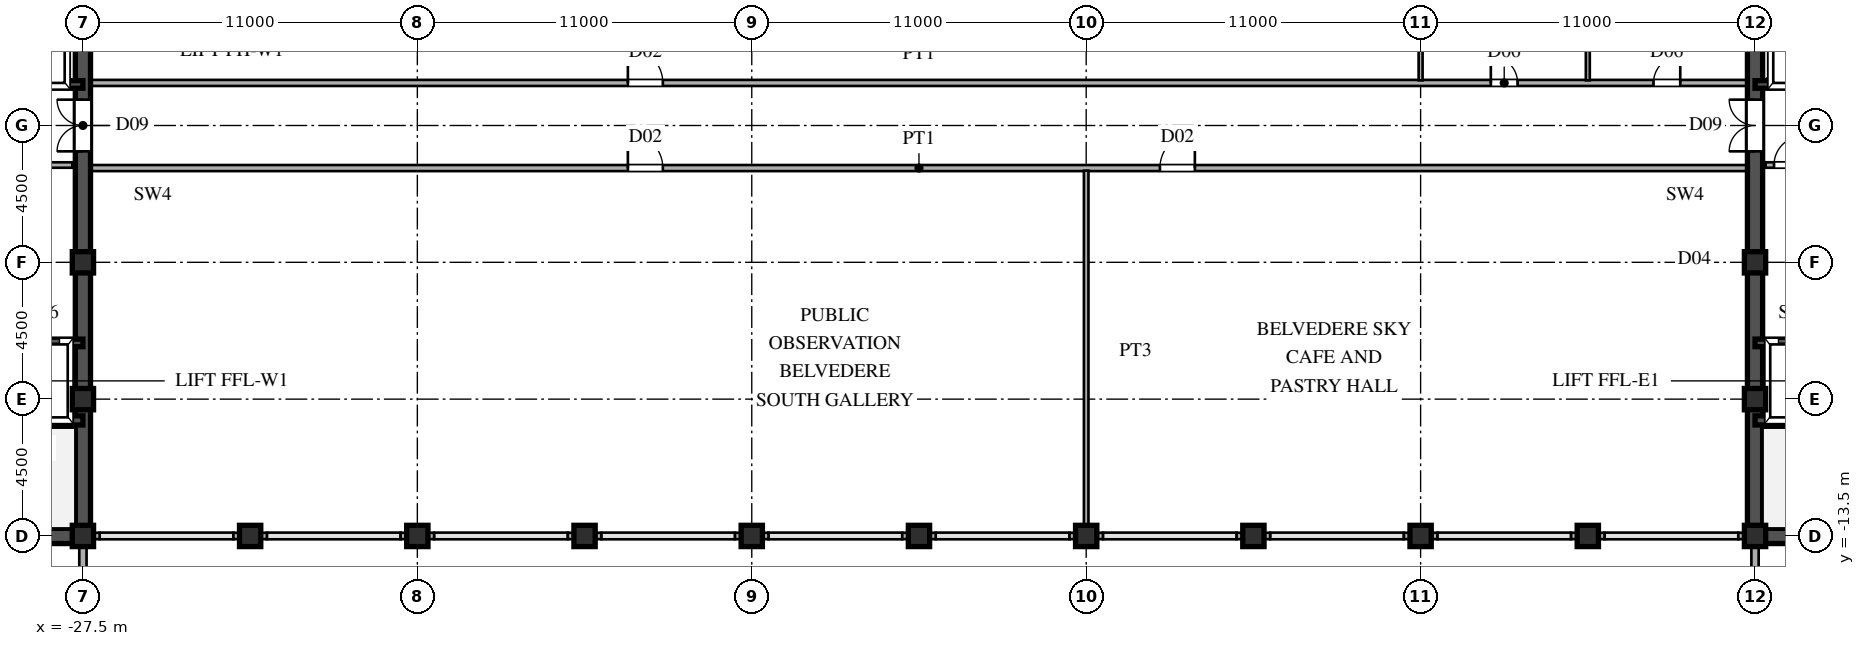
"""IFC4 building model, lengths in metres.
Left out: names, types, materials, properties, quantities, classifications, styles, units other than length and angle.
Written with IfcOpenShell. Run it as: python <this file> out.ifc"""

import sys

from ifc_helpers import new_model, si_unit, direction, frame, frame_2d, origin, origin_2d, place, context, subcontext, project, spatial, rectangle, hollow_rectangle, extrude, source, transform, mapped, element, fill, save


model = new_model("IFC4")
c1 = context("Model", 3, precision=1e-05, world=origin(), true_north=direction((0.0, 1.0)))
c2 = subcontext(c1, "Body", "Model", "MODEL_VIEW")
j1 = project(units=[si_unit("LENGTHUNIT", "METRE"), si_unit("PLANEANGLEUNIT", "RADIAN")], contexts=[c1])
p1 = place(None, origin())
s1 = spatial("IfcSite", under=j1, at=p1, CompositionType="ELEMENT")
p2 = place(p1, origin())
s2 = spatial("IfcBuilding", under=s1, at=p2, CompositionType="ELEMENT")
p3 = place(p2, frame((0.0, 0.0, 269.4)))
s3 = spatial("IfcBuildingStorey", under=s2, at=p3, CompositionType="ELEMENT", Elevation=269.4)
m1 = source(origin(), c2, "Body", "SweptSolid", [
    extrude(hollow_rectangle(XDim=0.7, YDim=0.7, WallThickness=0.03, at=origin_2d()), origin(), (0.0, 0.0, 1.0), 4.8),
])
for number, where, z_axis, x_axis in (
    (1, (-27.5, -13.5, 0.0), (0.0, 0.0, 1.0), (1.0, 0.0, 0.0)),
    (2, (-27.5, -9.0, 0.0), (0.0, 0.0, 1.0), (1.0, 0.0, 0.0)),
    (3, (-27.5, -4.5, 0.0), (0.0, 0.0, 1.0), (1.0, 0.0, 0.0)),
    (4, (27.5, -13.5, 0.0), (0.0, 0.0, 1.0), (1.0, 0.0, 0.0)),
    (5, (27.5, -9.0, 0.0), (0.0, 0.0, 1.0), (1.0, 0.0, 0.0)),
    (6, (27.5, -4.5, 0.0), (0.0, 0.0, 1.0), (1.0, 0.0, 0.0)),
    (7, (-22.0, -13.5, 0.0), (0.0, 0.0, 1.0), (1.0, 0.0, 0.0)),
    (8, (-16.5, -13.5, 0.0), (0.0, 0.0, 1.0), (1.0, 0.0, 0.0)),
    (9, (-11.0, -13.5, 0.0), (0.0, 0.0, 1.0), (1.0, 0.0, 0.0)),
    (10, (-5.5, -13.5, 0.0), (0.0, 0.0, 1.0), (1.0, 0.0, 0.0)),
    (11, (0.0, -13.5, 0.0), (0.0, 0.0, 1.0), (1.0, 0.0, 0.0)),
    (12, (5.5, -13.5, 0.0), (0.0, 0.0, 1.0), (1.0, 0.0, 0.0)),
    (13, (11.0, -13.5, 0.0), (0.0, 0.0, 1.0), (1.0, 0.0, 0.0)),
    (14, (16.5, -13.5, 0.0), (0.0, 0.0, 1.0), (1.0, 0.0, 0.0)),
    (15, (22.0, -13.5, 0.0), (0.0, 0.0, 1.0), (1.0, 0.0, 0.0)),
):
    element("IfcColumn", number, at=place(p3, frame(where, z_axis=z_axis, x_axis=x_axis)), inside=s3, PredefinedType="COLUMN", context=c2, shape_type="MappedRepresentation", body=[
        mapped(m1, transform((0.0, 0.0, 0.0), scale=1.0)),
    ])
p4 = place(p3, frame((-27.5, -15.98, 0.0), z_axis=(0.0, 0.0, 1.0), x_axis=(0.0, 1.0, 0.0)))
e16 = element("IfcWall", 16, at=p4, inside=s3, PredefinedType="SOLIDWALL", context=c2, shape_type="SweptSolid", body=[
    extrude(rectangle(XDim=1.605, YDim=0.24, at=frame_2d((0.803, 0.0))), origin(), (0.0, 0.0, 1.0), 4.54),
])
p5 = place(p3, frame((-27.5, -14.375, 0.0), z_axis=(0.0, 0.0, 1.0), x_axis=(0.0, 1.0, 0.0)))
e17 = element("IfcWall", 17, at=p5, inside=s3, PredefinedType="SOLIDWALL", context=c2, shape_type="SweptSolid", body=[
    extrude(rectangle(XDim=0.62, YDim=0.24, at=frame_2d((0.31, 0.0))), origin(), (0.0, 0.0, 1.0), 4.04),
])
p6 = place(p3, frame((27.5, -15.98, 0.0), z_axis=(0.0, 0.0, 1.0), x_axis=(0.0, 1.0, 0.0)))
e18 = element("IfcWall", 18, at=p6, inside=s3, PredefinedType="SOLIDWALL", context=c2, shape_type="SweptSolid", body=[
    extrude(rectangle(XDim=1.605, YDim=0.24, at=frame_2d((0.803, 0.0))), origin(), (0.0, 0.0, 1.0), 4.54),
])
p7 = place(p3, frame((27.5, -14.375, 0.0), z_axis=(0.0, 0.0, 1.0), x_axis=(0.0, 1.0, 0.0)))
e19 = element("IfcWall", 19, at=p7, inside=s3, PredefinedType="SOLIDWALL", context=c2, shape_type="SweptSolid", body=[
    extrude(rectangle(XDim=0.62, YDim=0.24, at=frame_2d((0.31, 0.0))), origin(), (0.0, 0.0, 1.0), 4.04),
])
p8 = place(p3, frame((-27.49, -13.5, 0.0), z_axis=(0.0, 0.0, 1.0), x_axis=(1.0, 0.0, 0.0)))
e20 = element("IfcWall", 20, at=p8, inside=s3, PredefinedType="SOLIDWALL", context=c2, shape_type="SweptSolid", body=[
    extrude(rectangle(XDim=0.54, YDim=0.21, at=frame_2d((0.27, 0.0))), origin(), (0.0, 0.0, 1.0), 4.04),
])
for number, where, z_axis, x_axis in (
    (21, (-22.55, -13.5, 0.0), (0.0, 0.0, 1.0), (1.0, 0.0, 0.0)),
    (22, (-17.05, -13.5, 0.0), (0.0, 0.0, 1.0), (1.0, 0.0, 0.0)),
    (23, (-11.55, -13.5, 0.0), (0.0, 0.0, 1.0), (1.0, 0.0, 0.0)),
    (24, (-6.05, -13.5, 0.0), (0.0, 0.0, 1.0), (1.0, 0.0, 0.0)),
    (25, (-0.55, -13.5, 0.0), (0.0, 0.0, 1.0), (1.0, 0.0, 0.0)),
    (26, (4.95, -13.5, 0.0), (0.0, 0.0, 1.0), (1.0, 0.0, 0.0)),
    (27, (10.45, -13.5, 0.0), (0.0, 0.0, 1.0), (1.0, 0.0, 0.0)),
    (28, (15.95, -13.5, 0.0), (0.0, 0.0, 1.0), (1.0, 0.0, 0.0)),
    (29, (21.45, -13.5, 0.0), (0.0, 0.0, 1.0), (1.0, 0.0, 0.0)),
):
    element("IfcWall", number, at=place(p3, frame(where, z_axis=z_axis, x_axis=x_axis)), inside=s3, PredefinedType="SOLIDWALL", context=c2, shape_type="SweptSolid", body=[
        extrude(rectangle(XDim=1.1, YDim=0.21, at=frame_2d((0.55, 0.0))), origin(), (0.0, 0.0, 1.0), 4.04),
    ])
p9 = place(p3, frame((26.95, -13.5, 0.0), z_axis=(0.0, 0.0, 1.0), x_axis=(1.0, 0.0, 0.0)))
e30 = element("IfcWall", 30, at=p9, inside=s3, PredefinedType="SOLIDWALL", context=c2, shape_type="SweptSolid", body=[
    extrude(rectangle(XDim=0.54, YDim=0.21, at=frame_2d((0.27, 0.0))), origin(), (0.0, 0.0, 1.0), 4.04),
])
for number, where, z_axis, x_axis in (
    (31, (-27.5, -13.5, 0.0), (0.0, 0.0, 1.0), (0.0, 1.0, 0.0)),
    (32, (-27.5, 1.3, 0.0), (0.0, 0.0, 1.0), (0.0, 1.0, 0.0)),
):
    element("IfcWall", number, at=place(p3, frame(where, z_axis=z_axis, x_axis=x_axis)), inside=s3, PredefinedType="SHEAR", context=c2, shape_type="SweptSolid", body=[
        extrude(rectangle(XDim=12.2, YDim=0.5, at=frame_2d((6.1, 0.0))), origin(), (0.0, 0.0, 1.0), 4.54),
    ])
p10 = place(p3, frame((-27.5, -1.3, 0.0), z_axis=(0.0, 0.0, 1.0), x_axis=(0.0, 1.0, 0.0)))
e33 = element("IfcWall", 33, at=p10, inside=s3, PredefinedType="SHEAR", context=c2, shape_type="SweptSolid", body=[
    extrude(rectangle(XDim=2.6, YDim=0.5, at=frame_2d((1.3, 0.0))), origin(), (0.0, 0.0, 1.0), 4.54),
])
p11 = place(p10, frame((0.45, 0.0, 0.0)))
e34 = element("IfcOpeningElement", 34, at=p11, cuts=e33, PredefinedType="OPENING", context=c2, shape_type="SweptSolid", body=[
    extrude(rectangle(XDim=1.7, YDim=2.35, at=frame_2d((0.85, 1.175))), frame((0.0, 0.26, 0.0), z_axis=(0.0, -1.0, 0.0), x_axis=(1.0, 0.0, 0.0)), (0.0, 0.0, 1.0), 0.52),
])
p12 = place(p3, frame((-36.5, -13.5, 0.0), z_axis=(0.0, 0.0, 1.0), x_axis=(1.0, 0.0, 0.0)))
e35 = element("IfcWall", 35, at=p12, inside=s3, PredefinedType="SHEAR", context=c2, shape_type="SweptSolid", body=[
    extrude(rectangle(XDim=9.0, YDim=0.5, at=frame_2d((4.5, 0.0))), origin(), (0.0, 0.0, 1.0), 4.54),
])
p13 = place(p3, frame((-36.5, -9.7, 0.0), z_axis=(0.0, 0.0, 1.0), x_axis=(1.0, 0.0, 0.0)))
e36 = element("IfcWall", 36, at=p13, inside=s3, PredefinedType="SHEAR", context=c2, shape_type="SweptSolid", body=[
    extrude(rectangle(XDim=9.0, YDim=0.3, at=frame_2d((4.5, 0.0))), origin(), (0.0, 0.0, 1.0), 4.54),
])
p14 = place(p13, frame((0.6, 0.0, 0.0)))
e37 = element("IfcOpeningElement", 37, at=p14, cuts=e36, PredefinedType="OPENING", context=c2, shape_type="SweptSolid", body=[
    extrude(rectangle(XDim=1.1, YDim=2.2, at=frame_2d((0.55, 1.1))), frame((0.0, 0.16, 0.0), z_axis=(0.0, -1.0, 0.0), x_axis=(1.0, 0.0, 0.0)), (0.0, 0.0, 1.0), 0.32),
])
for number, where, z_axis, x_axis in (
    (38, (-30.3, -7.15, 0.0), (0.0, 0.0, 1.0), (1.0, 0.0, 0.0)),
    (39, (-30.3, 1.35, 0.0), (0.0, 0.0, 1.0), (1.0, 0.0, 0.0)),
):
    element("IfcWall", number, at=place(p3, frame(where, z_axis=z_axis, x_axis=x_axis)), inside=s3, PredefinedType="SHEAR", context=c2, shape_type="SweptSolid", body=[
        extrude(rectangle(XDim=2.8, YDim=0.25, at=frame_2d((1.4, 0.0))), origin(), (0.0, 0.0, 1.0), 4.54),
    ])
p15 = place(p3, frame((-30.3, -1.3, 0.0), z_axis=(0.0, 0.0, 1.0), x_axis=(1.0, 0.0, 0.0)))
e40 = element("IfcWall", 40, at=p15, inside=s3, PredefinedType="PARTITIONING", context=c2, shape_type="SweptSolid", body=[
    extrude(rectangle(XDim=2.45, YDim=0.18, at=frame_2d((1.225, 0.0))), origin(), (0.0, 0.0, 1.0), 4.54),
])
p16 = place(p15, frame((0.275, 0.0, 0.0)))
e41 = element("IfcOpeningElement", 41, at=p16, cuts=e40, PredefinedType="OPENING", context=c2, shape_type="SweptSolid", body=[
    extrude(rectangle(XDim=0.95, YDim=2.15, at=frame_2d((0.475, 1.075))), frame((0.0, 0.1, 0.0), z_axis=(0.0, -1.0, 0.0), x_axis=(1.0, 0.0, 0.0)), (0.0, 0.0, 1.0), 0.2),
])
for number, where, z_axis, x_axis in (
    (42, (27.5, -13.5, 0.0), (0.0, 0.0, 1.0), (0.0, 1.0, 0.0)),
    (43, (27.5, 1.3, 0.0), (0.0, 0.0, 1.0), (0.0, 1.0, 0.0)),
):
    element("IfcWall", number, at=place(p3, frame(where, z_axis=z_axis, x_axis=x_axis)), inside=s3, PredefinedType="SHEAR", context=c2, shape_type="SweptSolid", body=[
        extrude(rectangle(XDim=12.2, YDim=0.5, at=frame_2d((6.1, 0.0))), origin(), (0.0, 0.0, 1.0), 4.54),
    ])
p17 = place(p3, frame((27.5, -1.3, 0.0), z_axis=(0.0, 0.0, 1.0), x_axis=(0.0, 1.0, 0.0)))
e44 = element("IfcWall", 44, at=p17, inside=s3, PredefinedType="SHEAR", context=c2, shape_type="SweptSolid", body=[
    extrude(rectangle(XDim=2.6, YDim=0.5, at=frame_2d((1.3, 0.0))), origin(), (0.0, 0.0, 1.0), 4.54),
])
p18 = place(p17, frame((0.45, 0.0, 0.0)))
e45 = element("IfcOpeningElement", 45, at=p18, cuts=e44, PredefinedType="OPENING", context=c2, shape_type="SweptSolid", body=[
    extrude(rectangle(XDim=1.7, YDim=2.35, at=frame_2d((0.85, 1.175))), frame((0.0, 0.26, 0.0), z_axis=(0.0, -1.0, 0.0), x_axis=(1.0, 0.0, 0.0)), (0.0, 0.0, 1.0), 0.52),
])
p19 = place(p3, frame((27.5, -13.5, 0.0), z_axis=(0.0, 0.0, 1.0), x_axis=(1.0, 0.0, 0.0)))
e46 = element("IfcWall", 46, at=p19, inside=s3, PredefinedType="SHEAR", context=c2, shape_type="SweptSolid", body=[
    extrude(rectangle(XDim=9.0, YDim=0.5, at=frame_2d((4.5, 0.0))), origin(), (0.0, 0.0, 1.0), 4.54),
])
p20 = place(p3, frame((27.5, -9.7, 0.0), z_axis=(0.0, 0.0, 1.0), x_axis=(1.0, 0.0, 0.0)))
e47 = element("IfcWall", 47, at=p20, inside=s3, PredefinedType="SHEAR", context=c2, shape_type="SweptSolid", body=[
    extrude(rectangle(XDim=9.0, YDim=0.3, at=frame_2d((4.5, 0.0))), origin(), (0.0, 0.0, 1.0), 4.54),
])
p21 = place(p20, frame((7.3, 0.0, 0.0)))
e48 = element("IfcOpeningElement", 48, at=p21, cuts=e47, PredefinedType="OPENING", context=c2, shape_type="SweptSolid", body=[
    extrude(rectangle(XDim=1.1, YDim=2.2, at=frame_2d((0.55, 1.1))), frame((0.0, 0.16, 0.0), z_axis=(0.0, -1.0, 0.0), x_axis=(1.0, 0.0, 0.0)), (0.0, 0.0, 1.0), 0.32),
])
for number, where, z_axis, x_axis in (
    (49, (27.5, -7.15, 0.0), (0.0, 0.0, 1.0), (1.0, 0.0, 0.0)),
    (50, (27.5, 1.35, 0.0), (0.0, 0.0, 1.0), (1.0, 0.0, 0.0)),
):
    element("IfcWall", number, at=place(p3, frame(where, z_axis=z_axis, x_axis=x_axis)), inside=s3, PredefinedType="SHEAR", context=c2, shape_type="SweptSolid", body=[
        extrude(rectangle(XDim=2.8, YDim=0.25, at=frame_2d((1.4, 0.0))), origin(), (0.0, 0.0, 1.0), 4.54),
    ])
p22 = place(p3, frame((27.85, -1.3, 0.0), z_axis=(0.0, 0.0, 1.0), x_axis=(1.0, 0.0, 0.0)))
e51 = element("IfcWall", 51, at=p22, inside=s3, PredefinedType="PARTITIONING", context=c2, shape_type="SweptSolid", body=[
    extrude(rectangle(XDim=2.45, YDim=0.18, at=frame_2d((1.225, 0.0))), origin(), (0.0, 0.0, 1.0), 4.54),
])
p23 = place(p22, frame((0.275, 0.0, 0.0)))
e52 = element("IfcOpeningElement", 52, at=p23, cuts=e51, PredefinedType="OPENING", context=c2, shape_type="SweptSolid", body=[
    extrude(rectangle(XDim=0.95, YDim=2.15, at=frame_2d((0.475, 1.075))), frame((0.0, 0.1, 0.0), z_axis=(0.0, -1.0, 0.0), x_axis=(1.0, 0.0, 0.0)), (0.0, 0.0, 1.0), 0.2),
])
p24 = place(p3, frame((-27.245, -1.4, 0.0), z_axis=(0.0, 0.0, 1.0), x_axis=(1.0, 0.0, 0.0)))
e53 = element("IfcWall", 53, at=p24, inside=s3, PredefinedType="PARTITIONING", context=c2, shape_type="SweptSolid", body=[
    extrude(rectangle(XDim=54.49, YDim=0.2, at=frame_2d((27.245, 0.0))), origin(), (0.0, 0.0, 1.0), 4.54),
])
p25 = place(p24, frame((17.67, 0.0, 0.0)))
e54 = element("IfcOpeningElement", 54, at=p25, cuts=e53, PredefinedType="OPENING", context=c2, shape_type="SweptSolid", body=[
    extrude(rectangle(XDim=1.15, YDim=2.2, at=frame_2d((0.575, 1.1))), frame((0.0, 0.11, 0.0), z_axis=(0.0, -1.0, 0.0), x_axis=(1.0, 0.0, 0.0)), (0.0, 0.0, 1.0), 0.22),
])
p26 = place(p24, frame((35.17, 0.0, 0.0)))
e55 = element("IfcOpeningElement", 55, at=p26, cuts=e53, PredefinedType="OPENING", context=c2, shape_type="SweptSolid", body=[
    extrude(rectangle(XDim=1.15, YDim=2.2, at=frame_2d((0.575, 1.1))), frame((0.0, 0.11, 0.0), z_axis=(0.0, -1.0, 0.0), x_axis=(1.0, 0.0, 0.0)), (0.0, 0.0, 1.0), 0.22),
])
p27 = place(p3, frame((-27.245, 1.4, 0.0), z_axis=(0.0, 0.0, 1.0), x_axis=(1.0, 0.0, 0.0)))
e56 = element("IfcWall", 56, at=p27, inside=s3, PredefinedType="PARTITIONING", context=c2, shape_type="SweptSolid", body=[
    extrude(rectangle(XDim=54.49, YDim=0.2, at=frame_2d((27.245, 0.0))), origin(), (0.0, 0.0, 1.0), 4.54),
])
p28 = place(p27, frame((17.67, 0.0, 0.0)))
e57 = element("IfcOpeningElement", 57, at=p28, cuts=e56, PredefinedType="OPENING", context=c2, shape_type="SweptSolid", body=[
    extrude(rectangle(XDim=1.15, YDim=2.2, at=frame_2d((0.575, 1.1))), frame((0.0, 0.11, 0.0), z_axis=(0.0, -1.0, 0.0), x_axis=(1.0, 0.0, 0.0)), (0.0, 0.0, 1.0), 0.22),
])
p29 = place(p27, frame((46.055, 0.0, 0.0)))
e58 = element("IfcOpeningElement", 58, at=p29, cuts=e56, PredefinedType="OPENING", context=c2, shape_type="SweptSolid", body=[
    extrude(rectangle(XDim=0.88, YDim=2.1, at=frame_2d((0.44, 1.05))), frame((0.0, 0.11, 0.0), z_axis=(0.0, -1.0, 0.0), x_axis=(1.0, 0.0, 0.0)), (0.0, 0.0, 1.0), 0.22),
])
p30 = place(p27, frame((51.405, 0.0, 0.0)))
e59 = element("IfcOpeningElement", 59, at=p30, cuts=e56, PredefinedType="OPENING", context=c2, shape_type="SweptSolid", body=[
    extrude(rectangle(XDim=0.88, YDim=2.1, at=frame_2d((0.44, 1.05))), frame((0.0, 0.11, 0.0), z_axis=(0.0, -1.0, 0.0), x_axis=(1.0, 0.0, 0.0)), (0.0, 0.0, 1.0), 0.22),
])
p31 = place(p3, frame((5.5, -13.39, 0.0), z_axis=(0.0, 0.0, 1.0), x_axis=(0.0, 1.0, 0.0)))
e60 = element("IfcWall", 60, at=p31, inside=s3, PredefinedType="PARTITIONING", context=c2, shape_type="SweptSolid", body=[
    extrude(rectangle(XDim=11.905, YDim=0.15, at=frame_2d((5.952, 0.0))), origin(), (0.0, 0.0, 1.0), 3.24),
])
p32 = place(p3, frame((16.5, 1.485, 0.0), z_axis=(0.0, 0.0, 1.0), x_axis=(0.0, 1.0, 0.0)))
e61 = element("IfcWall", 61, at=p32, inside=s3, PredefinedType="PARTITIONING", context=c2, shape_type="SweptSolid", body=[
    extrude(rectangle(XDim=11.905, YDim=0.13, at=frame_2d((5.952, 0.0))), origin(), (0.0, 0.0, 1.0), 3.24),
])
p33 = place(p32, frame((6.99, 0.0, 0.0)))
e62 = element("IfcOpeningElement", 62, at=p33, cuts=e61, PredefinedType="OPENING", context=c2, shape_type="SweptSolid", body=[
    extrude(rectangle(XDim=0.95, YDim=2.15, at=frame_2d((0.475, 1.075))), frame((0.0, 0.075, 0.0), z_axis=(0.0, -1.0, 0.0), x_axis=(1.0, 0.0, 0.0)), (0.0, 0.0, 1.0), 0.15),
])
p34 = place(p3, frame((22.0, 1.485, 0.0), z_axis=(0.0, 0.0, 1.0), x_axis=(0.0, 1.0, 0.0)))
e63 = element("IfcWall", 63, at=p34, inside=s3, PredefinedType="PARTITIONING", context=c2, shape_type="SweptSolid", body=[
    extrude(rectangle(XDim=2.83, YDim=0.13, at=frame_2d((1.415, 0.0))), origin(), (0.0, 0.0, 1.0), 3.24),
])
m2 = source(origin(), c2, "Body", "SweptSolid", [
    extrude(rectangle(XDim=1.7, YDim=2.35, at=frame_2d((0.85, 1.175))), frame((0.0, 0.025, 0.0), z_axis=(0.0, -1.0, 0.0), x_axis=(1.0, 0.0, 0.0)), (0.0, 0.0, 1.0), 0.05),
])
p35 = place(p11, origin())
e64 = element("IfcDoor", 64, at=p35, inside=s3, OperationType="DOUBLE_SWING_LEFT", PredefinedType="DOOR", context=c2, shape_type="MappedRepresentation", body=[
    mapped(m2, transform((0.0, 0.0, 0.0), scale=1.0)),
])
fill(e34, e64)
p36 = place(p18, origin())
e65 = element("IfcDoor", 65, at=p36, inside=s3, OperationType="DOUBLE_SWING_LEFT", PredefinedType="DOOR", context=c2, shape_type="MappedRepresentation", body=[
    mapped(m2, transform((0.0, 0.0, 0.0), scale=1.0)),
])
fill(e45, e65)
m3 = source(origin(), c2, "Body", "SweptSolid", [
    extrude(rectangle(XDim=0.95, YDim=2.15, at=frame_2d((0.475, 1.075))), frame((0.0, 0.025, 0.0), z_axis=(0.0, -1.0, 0.0), x_axis=(1.0, 0.0, 0.0)), (0.0, 0.0, 1.0), 0.05),
])
p37 = place(p23, origin())
e66 = element("IfcDoor", 66, at=p37, inside=s3, OperationType="SINGLE_SWING_RIGHT", PredefinedType="DOOR", context=c2, shape_type="MappedRepresentation", body=[
    mapped(m3, transform((0.0, 0.0, 0.0), scale=1.0)),
])
fill(e52, e66)
m4 = source(origin(), c2, "Body", "SweptSolid", [
    extrude(rectangle(XDim=1.15, YDim=2.2, at=frame_2d((0.575, 1.1))), frame((0.0, 0.025, 0.0), z_axis=(0.0, -1.0, 0.0), x_axis=(1.0, 0.0, 0.0)), (0.0, 0.0, 1.0), 0.05),
])
p38 = place(p25, origin())
e67 = element("IfcDoor", 67, at=p38, inside=s3, OperationType="SINGLE_SWING_LEFT", PredefinedType="DOOR", context=c2, shape_type="MappedRepresentation", body=[
    mapped(m4, transform((0.0, 0.0, 0.0), scale=1.0)),
])
fill(e54, e67)
p39 = place(p26, origin())
e68 = element("IfcDoor", 68, at=p39, inside=s3, OperationType="SINGLE_SWING_RIGHT", PredefinedType="DOOR", context=c2, shape_type="MappedRepresentation", body=[
    mapped(m4, transform((0.0, 0.0, 0.0), scale=1.0)),
])
fill(e55, e68)
p40 = place(p28, origin())
e69 = element("IfcDoor", 69, at=p40, inside=s3, OperationType="SINGLE_SWING_LEFT", PredefinedType="DOOR", context=c2, shape_type="MappedRepresentation", body=[
    mapped(m4, transform((0.0, 0.0, 0.0), scale=1.0)),
])
fill(e57, e69)
m5 = source(origin(), c2, "Body", "SweptSolid", [
    extrude(rectangle(XDim=0.88, YDim=2.1, at=frame_2d((0.44, 1.05))), frame((0.0, 0.025, 0.0), z_axis=(0.0, -1.0, 0.0), x_axis=(1.0, 0.0, 0.0)), (0.0, 0.0, 1.0), 0.05),
])
p41 = place(p29, origin())
e70 = element("IfcDoor", 70, at=p41, inside=s3, OperationType="SINGLE_SWING_LEFT", PredefinedType="DOOR", context=c2, shape_type="MappedRepresentation", body=[
    mapped(m5, transform((0.0, 0.0, 0.0), scale=1.0)),
])
fill(e58, e70)
p42 = place(p30, origin())
e71 = element("IfcDoor", 71, at=p42, inside=s3, OperationType="SINGLE_SWING_RIGHT", PredefinedType="DOOR", context=c2, shape_type="MappedRepresentation", body=[
    mapped(m5, transform((0.0, 0.0, 0.0), scale=1.0)),
])
fill(e59, e71)
save(model, sys.argv[1])
